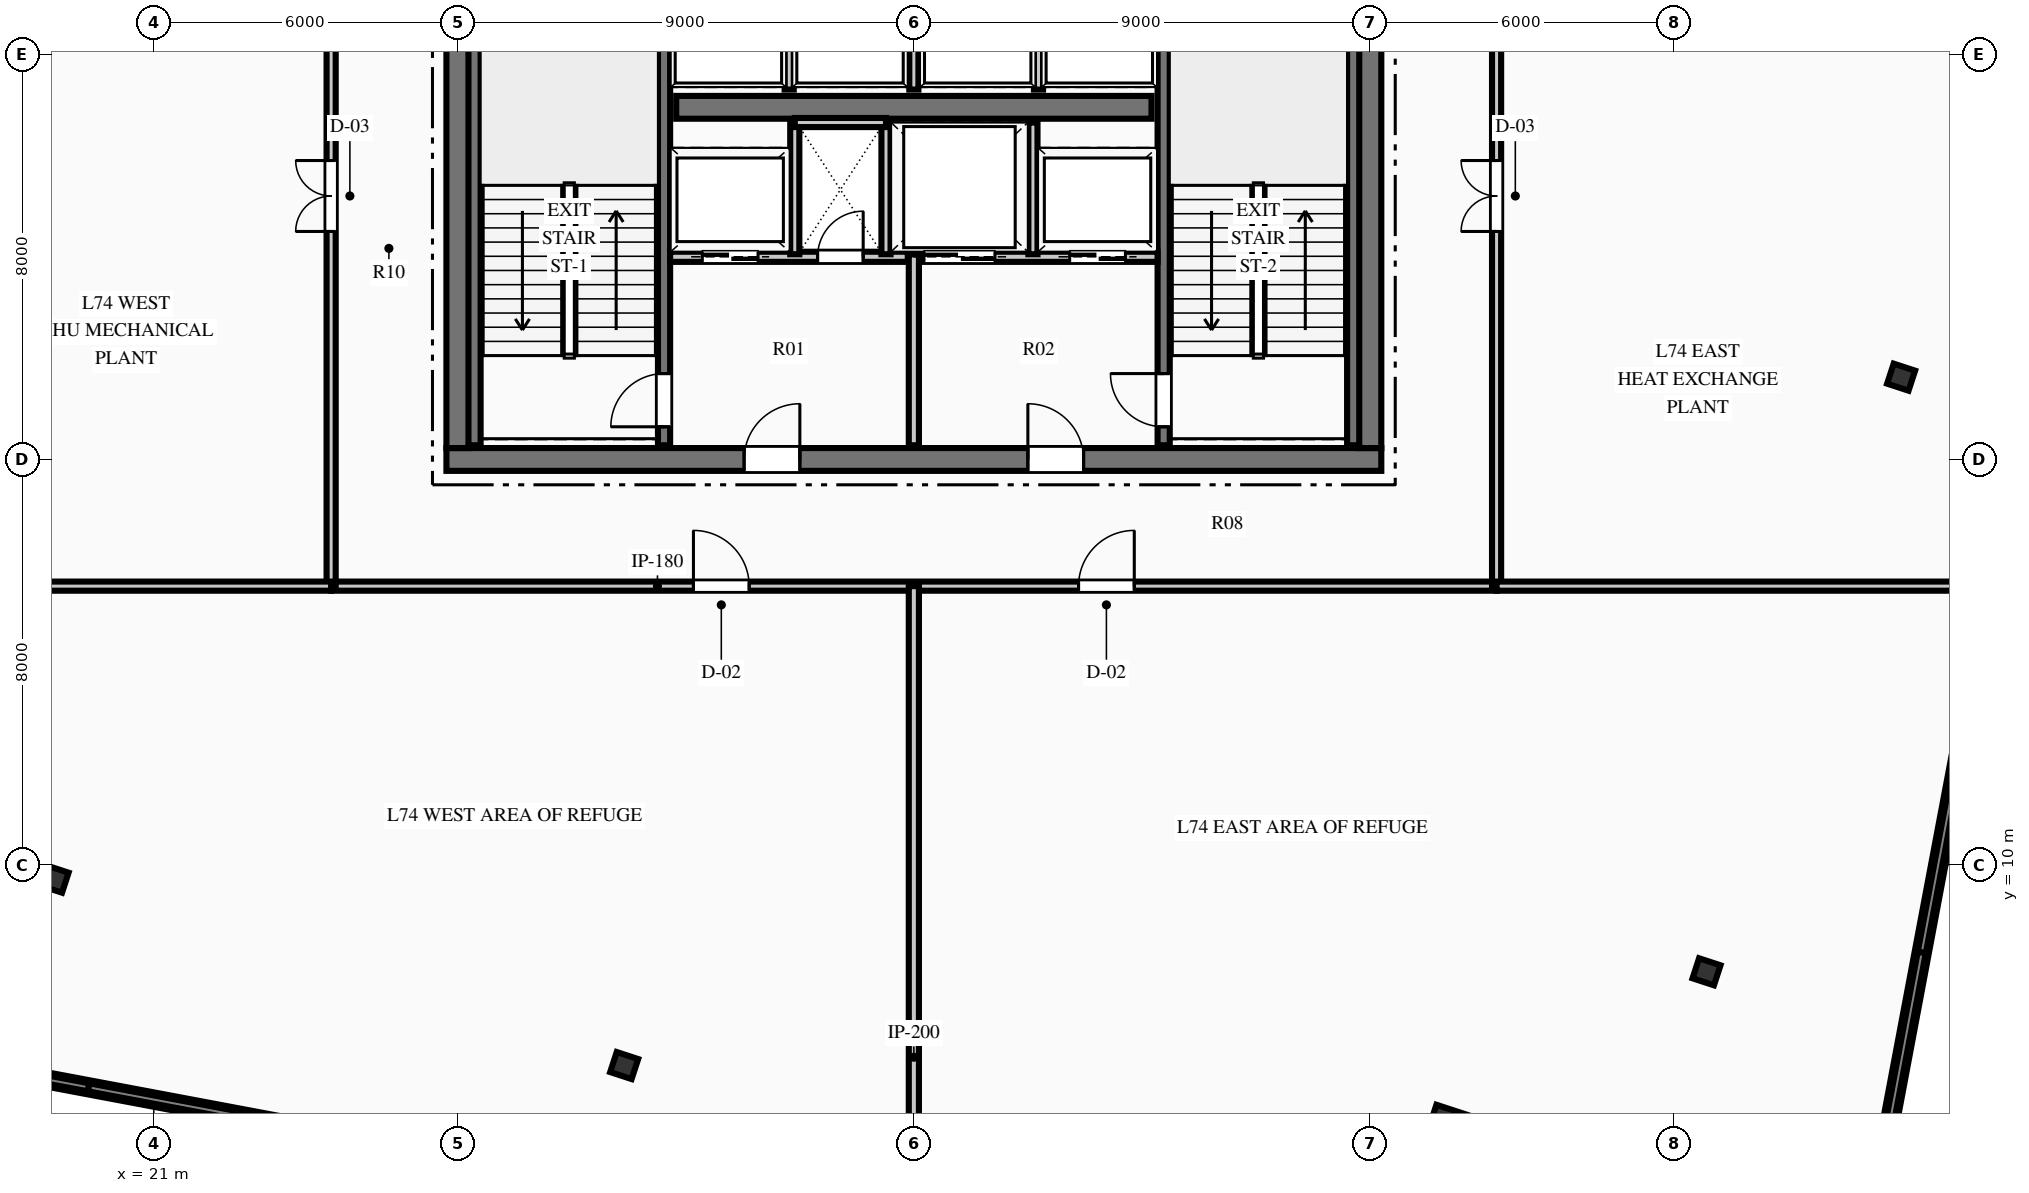
"""IFC4 building model, lengths in metres.
Left out: names, types, materials, properties, quantities, classifications, styles, units other than length and angle.
Written with IfcOpenShell. Run it as: python <this file> out.ifc"""

import sys

from ifc_helpers import new_model, si_unit, direction, frame, frame_2d, origin, origin_2d, place, context, subcontext, project, spatial, rectangle, hollow_rectangle, i_section, extrude, element, fill, save


model = new_model("IFC4")
c1 = context("Model", 3, precision=1e-05, world=origin(), true_north=direction((0.0, 1.0)))
c2 = subcontext(c1, "Body", "Model", "MODEL_VIEW")
j1 = project(units=[si_unit("LENGTHUNIT", "METRE"), si_unit("PLANEANGLEUNIT", "RADIAN")], contexts=[c1])
p1 = place(None, origin())
s1 = spatial("IfcSite", under=j1, at=p1, CompositionType="ELEMENT")
p2 = place(p1, origin())
s2 = spatial("IfcBuilding", under=s1, at=p2, CompositionType="ELEMENT")
p3 = place(p2, frame((0.0, 0.0, 293.7)))
s3 = spatial("IfcBuildingStorey", under=s2, at=p3, CompositionType="ELEMENT", Elevation=293.7)
p4 = place(p3, frame((26.775, 18.0, 0.0), z_axis=(0.0, 0.0, 1.0), x_axis=(1.0, 0.0, 0.0)))
e1 = element("IfcWall", 1, at=p4, inside=s3, PredefinedType="SHEAR", context=c2, shape_type="SweptSolid", body=[
    extrude(rectangle(XDim=18.45, YDim=0.45, at=frame_2d((9.225, 0.0))), origin(), (0.0, 0.0, 1.0), 4.5),
])
p5 = place(p4, frame((5.875, 0.0, 0.0)))
e2 = element("IfcOpeningElement", 2, at=p5, cuts=e1, PredefinedType="OPENING", context=c2, shape_type="SweptSolid", body=[
    extrude(rectangle(XDim=1.1, YDim=2.15, at=frame_2d((0.55, 1.075))), frame((0.0, 0.235, 0.0), z_axis=(0.0, -1.0, 0.0), x_axis=(1.0, 0.0, 0.0)), (0.0, 0.0, 1.0), 0.47),
])
p6 = place(p4, frame((11.475, 0.0, 0.0)))
e3 = element("IfcOpeningElement", 3, at=p6, cuts=e1, PredefinedType="OPENING", context=c2, shape_type="SweptSolid", body=[
    extrude(rectangle(XDim=1.1, YDim=2.15, at=frame_2d((0.55, 1.075))), frame((0.0, 0.235, 0.0), z_axis=(0.0, -1.0, 0.0), x_axis=(1.0, 0.0, 0.0)), (0.0, 0.0, 1.0), 0.47),
])
p7 = place(p3, frame((27.0, 18.225, 0.0), z_axis=(0.0, 0.0, 1.0), x_axis=(0.0, 1.0, 0.0)))
e4 = element("IfcWall", 4, at=p7, inside=s3, PredefinedType="SHEAR", context=c2, shape_type="SweptSolid", body=[
    extrude(rectangle(XDim=15.55, YDim=0.45, at=frame_2d((7.775, 0.0))), origin(), (0.0, 0.0, 1.0), 4.5),
])
p8 = place(p7, frame((10.015, 0.0, 0.0)))
e5 = element("IfcOpeningElement", 5, at=p8, cuts=e4, PredefinedType="OPENING", context=c2, shape_type="SweptSolid", body=[
    extrude(rectangle(XDim=1.4, YDim=2.2, at=frame_2d((0.7, 1.1))), frame((0.0, 0.235, 0.0), z_axis=(0.0, -1.0, 0.0), x_axis=(1.0, 0.0, 0.0)), (0.0, 0.0, 1.0), 0.47),
])
p9 = place(p3, frame((45.0, 18.225, 0.0), z_axis=(0.0, 0.0, 1.0), x_axis=(0.0, 1.0, 0.0)))
e6 = element("IfcWall", 6, at=p9, inside=s3, PredefinedType="SHEAR", context=c2, shape_type="SweptSolid", body=[
    extrude(rectangle(XDim=15.55, YDim=0.45, at=frame_2d((7.775, 0.0))), origin(), (0.0, 0.0, 1.0), 4.5),
])
p10 = place(p9, frame((10.015, 0.0, 0.0)))
e7 = element("IfcOpeningElement", 7, at=p10, cuts=e6, PredefinedType="OPENING", context=c2, shape_type="SweptSolid", body=[
    extrude(rectangle(XDim=1.4, YDim=2.2, at=frame_2d((0.7, 1.1))), frame((0.0, 0.235, 0.0), z_axis=(0.0, -1.0, 0.0), x_axis=(1.0, 0.0, 0.0)), (0.0, 0.0, 1.0), 0.47),
])
p11 = place(p3, frame((31.31, 24.95, 0.0), z_axis=(0.0, 0.0, 1.0), x_axis=(1.0, 0.0, 0.0)))
e8 = element("IfcWall", 8, at=p11, inside=s3, PredefinedType="SHEAR", context=c2, shape_type="SweptSolid", body=[
    extrude(rectangle(XDim=9.38, YDim=0.45, at=frame_2d((4.69, 0.0))), origin(), (0.0, 0.0, 1.0), 4.5),
])
p12 = place(p3, frame((31.07, 18.28, 0.0), z_axis=(0.0, 0.0, 1.0), x_axis=(0.0, 1.0, 0.0)))
e9 = element("IfcWall", 9, at=p12, inside=s3, PredefinedType="SHEAR", context=c2, shape_type="SweptSolid", body=[
    extrude(rectangle(XDim=8.26, YDim=0.24, at=frame_2d((4.13, 0.0))), origin(), (0.0, 0.0, 1.0), 4.5),
])
p13 = place(p12, frame((0.365, 0.0, 0.0)))
e10 = element("IfcOpeningElement", 10, at=p13, cuts=e9, PredefinedType="OPENING", context=c2, shape_type="SweptSolid", body=[
    extrude(rectangle(XDim=1.05, YDim=2.15, at=frame_2d((0.525, 1.075))), frame((0.0, 0.13, 0.0), z_axis=(0.0, -1.0, 0.0), x_axis=(1.0, 0.0, 0.0)), (0.0, 0.0, 1.0), 0.26),
])
p14 = place(p3, frame((27.33, 18.28, 0.0), z_axis=(0.0, 0.0, 1.0), x_axis=(0.0, 1.0, 0.0)))
e11 = element("IfcWall", 11, at=p14, inside=s3, PredefinedType="SHEAR", context=c2, shape_type="SweptSolid", body=[
    extrude(rectangle(XDim=8.26, YDim=0.24, at=frame_2d((4.13, 0.0))), origin(), (0.0, 0.0, 1.0), 4.5),
])
p15 = place(p3, frame((40.93, 18.28, 0.0), z_axis=(0.0, 0.0, 1.0), x_axis=(0.0, 1.0, 0.0)))
e12 = element("IfcWall", 12, at=p15, inside=s3, PredefinedType="SHEAR", context=c2, shape_type="SweptSolid", body=[
    extrude(rectangle(XDim=8.26, YDim=0.24, at=frame_2d((4.13, 0.0))), origin(), (0.0, 0.0, 1.0), 4.5),
])
p16 = place(p15, frame((0.365, 0.0, 0.0)))
e13 = element("IfcOpeningElement", 13, at=p16, cuts=e12, PredefinedType="OPENING", context=c2, shape_type="SweptSolid", body=[
    extrude(rectangle(XDim=1.05, YDim=2.15, at=frame_2d((0.525, 1.075))), frame((0.0, 0.13, 0.0), z_axis=(0.0, -1.0, 0.0), x_axis=(1.0, 0.0, 0.0)), (0.0, 0.0, 1.0), 0.26),
])
p17 = place(p3, frame((44.67, 18.28, 0.0), z_axis=(0.0, 0.0, 1.0), x_axis=(0.0, 1.0, 0.0)))
e14 = element("IfcWall", 14, at=p17, inside=s3, PredefinedType="SHEAR", context=c2, shape_type="SweptSolid", body=[
    extrude(rectangle(XDim=8.26, YDim=0.24, at=frame_2d((4.13, 0.0))), origin(), (0.0, 0.0, 1.0), 4.5),
])
p18 = place(p3, frame((46.728, 4.445, 0.0), z_axis=(0.0, 0.0, 1.0), x_axis=(0.311008203279, 0.950407227189, 0.0)))
e15 = element("IfcColumn", 15, at=p18, inside=s3, PredefinedType="COLUMN", context=c2, shape_type="SweptSolid", body=[
    extrude(hollow_rectangle(XDim=1.3, YDim=1.3, WallThickness=0.06, at=origin_2d()), origin(), (0.0, 0.0, 1.0), 4.5),
])
for number, where, z_axis, x_axis in (
    (16, (51.643, 7.889, 0.0), (0.0, 0.0, 1.0), (0.311, 0.95, 0.0)),
    (17, (55.483, 19.624, 0.0), (0.0, 0.0, 1.0), (0.311, 0.95, 0.0)),
    (18, (19.043, 9.716, 0.0), (0.0, 0.0, 1.0), (0.311, 0.95, 0.0)),
    (19, (30.283, 6.038, 0.0), (0.0, 0.0, 1.0), (0.311, 0.95, 0.0)),
):
    element("IfcColumn", number, at=place(p3, frame(where, z_axis=z_axis, x_axis=x_axis)), inside=s3, PredefinedType="COLUMN", context=c2, shape_type="SweptSolid", body=[
        extrude(i_section(OverallWidth=0.416, OverallDepth=0.445, WebThickness=0.039, FlangeThickness=0.063, at=origin_2d()), origin(), (0.0, 0.0, 1.0), 4.5),
    ])
p19 = place(p3, frame((58.432, 21.782, 0.0), z_axis=(0.0, 0.0, 1.0), x_axis=(-0.184810744713, -0.982774129003, 0.0)))
e20 = element("IfcWall", 20, at=p19, inside=s3, PredefinedType="STANDARD", context=c2, shape_type="SweptSolid", body=[
    extrude(rectangle(XDim=19.25, YDim=0.28, at=frame_2d((9.625, 0.0))), origin(), (0.0, 0.0, 1.0), 1.15),
])
p20 = place(p3, frame((32.514, 3.202, 0.0), z_axis=(0.0, 0.0, 1.0), x_axis=(-0.982774906714, 0.184806609009, 0.0)))
e21 = element("IfcWall", 21, at=p20, inside=s3, PredefinedType="STANDARD", context=c2, shape_type="SweptSolid", body=[
    extrude(rectangle(XDim=18.237, YDim=0.28, at=frame_2d((9.119, 0.0))), origin(), (0.0, 0.0, 1.0), 1.15),
])
p21 = place(p3, frame((36.0, 18.28, 0.0), z_axis=(0.0, 0.0, 1.0), x_axis=(0.0, 1.0, 0.0)))
e22 = element("IfcWall", 22, at=p21, inside=s3, PredefinedType="PARTITIONING", context=c2, shape_type="SweptSolid", body=[
    extrude(rectangle(XDim=3.77, YDim=0.2, at=frame_2d((1.885, 0.0))), origin(), (0.0, 0.0, 1.0), 4.1),
])
p22 = place(p3, frame((31.19, 22.0, 0.0), z_axis=(0.0, 0.0, 1.0), x_axis=(1.0, 0.0, 0.0)))
e23 = element("IfcWall", 23, at=p22, inside=s3, PredefinedType="PARTITIONING", context=c2, shape_type="SweptSolid", body=[
    extrude(rectangle(XDim=4.69, YDim=0.2, at=frame_2d((2.345, 0.0))), origin(), (0.0, 0.0, 1.0), 4.1),
])
p23 = place(p22, frame((2.91, 0.0, 0.0)))
e24 = element("IfcOpeningElement", 24, at=p23, cuts=e23, PredefinedType="OPENING", context=c2, shape_type="SweptSolid", body=[
    extrude(rectangle(XDim=0.9, YDim=2.15, at=frame_2d((0.45, 1.075))), frame((0.0, 0.11, 0.0), z_axis=(0.0, -1.0, 0.0), x_axis=(1.0, 0.0, 0.0)), (0.0, 0.0, 1.0), 0.22),
])
p24 = place(p22, frame((0.635, 0.0, 0.0)))
e25 = element("IfcOpeningElement", 25, at=p24, cuts=e23, PredefinedType="OPENING", context=c2, shape_type="SweptSolid", body=[
    extrude(rectangle(XDim=1.1, YDim=2.15, at=frame_2d((0.55, 1.075))), frame((0.0, 0.11, 0.0), z_axis=(0.0, -1.0, 0.0), x_axis=(1.0, 0.0, 0.0)), (0.0, 0.0, 1.0), 0.22),
])
p25 = place(p3, frame((36.12, 22.0, 0.0), z_axis=(0.0, 0.0, 1.0), x_axis=(1.0, 0.0, 0.0)))
e26 = element("IfcWall", 26, at=p25, inside=s3, PredefinedType="PARTITIONING", context=c2, shape_type="SweptSolid", body=[
    extrude(rectangle(XDim=4.69, YDim=0.2, at=frame_2d((2.345, 0.0))), origin(), (0.0, 0.0, 1.0), 4.1),
])
p26 = place(p25, frame((2.955, 0.0, 0.0)))
e27 = element("IfcOpeningElement", 27, at=p26, cuts=e26, PredefinedType="OPENING", context=c2, shape_type="SweptSolid", body=[
    extrude(rectangle(XDim=1.1, YDim=2.15, at=frame_2d((0.55, 1.075))), frame((0.0, 0.11, 0.0), z_axis=(0.0, -1.0, 0.0), x_axis=(1.0, 0.0, 0.0)), (0.0, 0.0, 1.0), 0.22),
])
p27 = place(p25, frame((0.08, 0.0, 0.0)))
e28 = element("IfcOpeningElement", 28, at=p27, cuts=e26, PredefinedType="OPENING", context=c2, shape_type="SweptSolid", body=[
    extrude(rectangle(XDim=1.4, YDim=2.2, at=frame_2d((0.7, 1.1))), frame((0.0, 0.11, 0.0), z_axis=(0.0, -1.0, 0.0), x_axis=(1.0, 0.0, 0.0)), (0.0, 0.0, 1.0), 0.22),
])
for number, where, z_axis, x_axis in (
    (29, (33.65, 22.05, 0.0), (0.0, 0.0, 1.0), (0.0, 1.0, 0.0)),
    (30, (35.45, 22.05, 0.0), (0.0, 0.0, 1.0), (0.0, 1.0, 0.0)),
):
    element("IfcWall", number, at=place(p3, frame(where, z_axis=z_axis, x_axis=x_axis)), inside=s3, PredefinedType="PARTITIONING", context=c2, shape_type="SweptSolid", body=[
        extrude(rectangle(XDim=2.6, YDim=0.18, at=frame_2d((1.3, 0.0))), origin(), (0.0, 0.0, 1.0), 4.1),
    ])
p28 = place(p3, frame((33.65, 24.65, 0.0), z_axis=(0.0, 0.0, 1.0), x_axis=(1.0, 0.0, 0.0)))
e31 = element("IfcWall", 31, at=p28, inside=s3, PredefinedType="PARTITIONING", context=c2, shape_type="SweptSolid", body=[
    extrude(rectangle(XDim=1.8, YDim=0.18, at=frame_2d((0.9, 0.0))), origin(), (0.0, 0.0, 1.0), 4.1),
])
p29 = place(p3, frame((38.35, 22.05, 0.0), z_axis=(0.0, 0.0, 1.0), x_axis=(0.0, 1.0, 0.0)))
e32 = element("IfcWall", 32, at=p29, inside=s3, PredefinedType="PARTITIONING", context=c2, shape_type="SweptSolid", body=[
    extrude(rectangle(XDim=2.6, YDim=0.18, at=frame_2d((1.3, 0.0))), origin(), (0.0, 0.0, 1.0), 4.1),
])
for number, where, z_axis, x_axis in (
    (33, (33.54, 25.3, 0.0), (0.0, 0.0, 1.0), (0.0, 1.0, 0.0)),
    (34, (36.0, 25.3, 0.0), (0.0, 0.0, 1.0), (0.0, 1.0, 0.0)),
    (35, (38.46, 25.3, 0.0), (0.0, 0.0, 1.0), (0.0, 1.0, 0.0)),
):
    element("IfcWall", number, at=place(p3, frame(where, z_axis=z_axis, x_axis=x_axis)), inside=s3, PredefinedType="PARTITIONING", context=c2, shape_type="SweptSolid", body=[
        extrude(rectangle(XDim=1.9, YDim=0.18, at=frame_2d((0.95, 0.0))), origin(), (0.0, 0.0, 1.0), 4.1),
    ])
p30 = place(p3, frame((24.5, 15.5, 0.0), z_axis=(0.0, 0.0, 1.0), x_axis=(1.0, 0.0, 0.0)))
e36 = element("IfcWall", 36, at=p30, inside=s3, PredefinedType="PARTITIONING", context=c2, shape_type="SweptSolid", body=[
    extrude(rectangle(XDim=23.0, YDim=0.18, at=frame_2d((11.5, 0.0))), origin(), (0.0, 0.0, 1.0), 4.1),
])
p31 = place(p30, frame((7.15, 0.0, 0.0)))
e37 = element("IfcOpeningElement", 37, at=p31, cuts=e36, PredefinedType="OPENING", context=c2, shape_type="SweptSolid", body=[
    extrude(rectangle(XDim=1.1, YDim=2.15, at=frame_2d((0.55, 1.075))), frame((0.0, 0.1, 0.0), z_axis=(0.0, -1.0, 0.0), x_axis=(1.0, 0.0, 0.0)), (0.0, 0.0, 1.0), 0.2),
])
p32 = place(p30, frame((14.75, 0.0, 0.0)))
e38 = element("IfcOpeningElement", 38, at=p32, cuts=e36, PredefinedType="OPENING", context=c2, shape_type="SweptSolid", body=[
    extrude(rectangle(XDim=1.1, YDim=2.15, at=frame_2d((0.55, 1.075))), frame((0.0, 0.1, 0.0), z_axis=(0.0, -1.0, 0.0), x_axis=(1.0, 0.0, 0.0)), (0.0, 0.0, 1.0), 0.2),
])
p33 = place(p3, frame((24.5, 15.5, 0.0), z_axis=(0.0, 0.0, 1.0), x_axis=(0.0, 1.0, 0.0)))
e39 = element("IfcWall", 39, at=p33, inside=s3, PredefinedType="PARTITIONING", context=c2, shape_type="SweptSolid", body=[
    extrude(rectangle(XDim=21.0, YDim=0.18, at=frame_2d((10.5, 0.0))), origin(), (0.0, 0.0, 1.0), 4.1),
])
p34 = place(p33, frame((7.0, 0.0, 0.0)))
e40 = element("IfcOpeningElement", 40, at=p34, cuts=e39, PredefinedType="OPENING", context=c2, shape_type="SweptSolid", body=[
    extrude(rectangle(XDim=1.4, YDim=2.2, at=frame_2d((0.7, 1.1))), frame((0.0, 0.1, 0.0), z_axis=(0.0, -1.0, 0.0), x_axis=(1.0, 0.0, 0.0)), (0.0, 0.0, 1.0), 0.2),
])
p35 = place(p3, frame((47.5, 15.5, 0.0), z_axis=(0.0, 0.0, 1.0), x_axis=(0.0, 1.0, 0.0)))
e41 = element("IfcWall", 41, at=p35, inside=s3, PredefinedType="PARTITIONING", context=c2, shape_type="SweptSolid", body=[
    extrude(rectangle(XDim=21.0, YDim=0.18, at=frame_2d((10.5, 0.0))), origin(), (0.0, 0.0, 1.0), 4.1),
])
p36 = place(p35, frame((7.0, 0.0, 0.0)))
e42 = element("IfcOpeningElement", 42, at=p36, cuts=e41, PredefinedType="OPENING", context=c2, shape_type="SweptSolid", body=[
    extrude(rectangle(XDim=1.4, YDim=2.2, at=frame_2d((0.7, 1.1))), frame((0.0, 0.1, 0.0), z_axis=(0.0, -1.0, 0.0), x_axis=(1.0, 0.0, 0.0)), (0.0, 0.0, 1.0), 0.2),
])
p37 = place(p3, frame((36.0, 2.587, 0.0), z_axis=(0.0, 0.0, 1.0), x_axis=(0.0, 1.0, 0.0)))
e43 = element("IfcWall", 43, at=p37, inside=s3, PredefinedType="PARTITIONING", context=c2, shape_type="SweptSolid", body=[
    extrude(rectangle(XDim=12.913, YDim=0.2, at=frame_2d((6.457, 0.0))), origin(), (0.0, 0.0, 1.0), 2.895),
])
p38 = place(p3, frame((12.444, 15.5, 0.0), z_axis=(0.0, 0.0, 1.0), x_axis=(1.0, 0.0, 0.0)))
e44 = element("IfcWall", 44, at=p38, inside=s3, PredefinedType="PARTITIONING", context=c2, shape_type="SweptSolid", body=[
    extrude(rectangle(XDim=12.056, YDim=0.18, at=frame_2d((6.028, 0.0))), origin(), (0.0, 0.0, 1.0), 3.689),
])
p39 = place(p3, frame((47.5, 15.5, 0.0), z_axis=(0.0, 0.0, 1.0), x_axis=(1.0, 0.0, 0.0)))
e45 = element("IfcWall", 45, at=p39, inside=s3, PredefinedType="PARTITIONING", context=c2, shape_type="SweptSolid", body=[
    extrude(rectangle(XDim=9.71, YDim=0.18, at=frame_2d((4.855, 0.0))), origin(), (0.0, 0.0, 1.0), 3.478),
])
p40 = place(p13, origin())
e46 = element("IfcDoor", 46, at=p40, inside=s3, OperationType="SINGLE_SWING_LEFT", PredefinedType="DOOR", context=c2, shape_type="SweptSolid", body=[
    extrude(rectangle(XDim=1.05, YDim=2.15, at=frame_2d((0.525, 1.075))), frame((0.0, 0.025, 0.0), z_axis=(0.0, -1.0, 0.0), x_axis=(1.0, 0.0, 0.0)), (0.0, 0.0, 1.0), 0.05),
])
fill(e10, e46)
p41 = place(p16, origin())
e47 = element("IfcDoor", 47, at=p41, inside=s3, OperationType="SINGLE_SWING_RIGHT", PredefinedType="DOOR", context=c2, shape_type="SweptSolid", body=[
    extrude(rectangle(XDim=1.05, YDim=2.15, at=frame_2d((0.525, 1.075))), frame((0.0, 0.025, 0.0), z_axis=(0.0, -1.0, 0.0), x_axis=(1.0, 0.0, 0.0)), (0.0, 0.0, 1.0), 0.05),
])
fill(e13, e47)
p42 = place(p5, origin())
e48 = element("IfcDoor", 48, at=p42, inside=s3, OperationType="SINGLE_SWING_RIGHT", PredefinedType="DOOR", context=c2, shape_type="SweptSolid", body=[
    extrude(rectangle(XDim=1.1, YDim=2.15, at=frame_2d((0.55, 1.075))), frame((0.0, 0.025, 0.0), z_axis=(0.0, -1.0, 0.0), x_axis=(1.0, 0.0, 0.0)), (0.0, 0.0, 1.0), 0.05),
])
fill(e2, e48)
p43 = place(p6, origin())
e49 = element("IfcDoor", 49, at=p43, inside=s3, OperationType="SINGLE_SWING_LEFT", PredefinedType="DOOR", context=c2, shape_type="SweptSolid", body=[
    extrude(rectangle(XDim=1.1, YDim=2.15, at=frame_2d((0.55, 1.075))), frame((0.0, 0.025, 0.0), z_axis=(0.0, -1.0, 0.0), x_axis=(1.0, 0.0, 0.0)), (0.0, 0.0, 1.0), 0.05),
])
fill(e3, e49)
p44 = place(p23, origin())
e50 = element("IfcDoor", 50, at=p44, inside=s3, OperationType="SINGLE_SWING_RIGHT", PredefinedType="DOOR", context=c2, shape_type="SweptSolid", body=[
    extrude(rectangle(XDim=0.9, YDim=2.15, at=frame_2d((0.45, 1.075))), frame((0.0, 0.025, 0.0), z_axis=(0.0, -1.0, 0.0), x_axis=(1.0, 0.0, 0.0)), (0.0, 0.0, 1.0), 0.05),
])
fill(e24, e50)
p45 = place(p31, origin())
e51 = element("IfcDoor", 51, at=p45, inside=s3, OperationType="SINGLE_SWING_LEFT", PredefinedType="DOOR", context=c2, shape_type="SweptSolid", body=[
    extrude(rectangle(XDim=1.1, YDim=2.15, at=frame_2d((0.55, 1.075))), frame((0.0, 0.025, 0.0), z_axis=(0.0, -1.0, 0.0), x_axis=(1.0, 0.0, 0.0)), (0.0, 0.0, 1.0), 0.05),
])
fill(e37, e51)
p46 = place(p32, origin())
e52 = element("IfcDoor", 52, at=p46, inside=s3, OperationType="SINGLE_SWING_RIGHT", PredefinedType="DOOR", context=c2, shape_type="SweptSolid", body=[
    extrude(rectangle(XDim=1.1, YDim=2.15, at=frame_2d((0.55, 1.075))), frame((0.0, 0.025, 0.0), z_axis=(0.0, -1.0, 0.0), x_axis=(1.0, 0.0, 0.0)), (0.0, 0.0, 1.0), 0.05),
])
fill(e38, e52)
p47 = place(p34, origin())
e53 = element("IfcDoor", 53, at=p47, inside=s3, OperationType="DOUBLE_DOOR_SINGLE_SWING", PredefinedType="DOOR", context=c2, shape_type="SweptSolid", body=[
    extrude(rectangle(XDim=1.4, YDim=2.2, at=frame_2d((0.7, 1.1))), frame((0.0, 0.025, 0.0), z_axis=(0.0, -1.0, 0.0), x_axis=(1.0, 0.0, 0.0)), (0.0, 0.0, 1.0), 0.05),
])
fill(e40, e53)
p48 = place(p36, origin())
e54 = element("IfcDoor", 54, at=p48, inside=s3, OperationType="DOUBLE_DOOR_SINGLE_SWING", PredefinedType="DOOR", context=c2, shape_type="SweptSolid", body=[
    extrude(rectangle(XDim=1.4, YDim=2.2, at=frame_2d((0.7, 1.1))), frame((0.0, 0.025, 0.0), z_axis=(0.0, -1.0, 0.0), x_axis=(1.0, 0.0, 0.0)), (0.0, 0.0, 1.0), 0.05),
])
fill(e42, e54)
p49 = place(p24, origin())
e55 = element("IfcDoor", 55, at=p49, inside=s3, OperationType="SLIDING_TO_LEFT", PredefinedType="DOOR", context=c2, shape_type="SweptSolid", body=[
    extrude(rectangle(XDim=1.1, YDim=2.15, at=frame_2d((0.55, 1.075))), frame((0.0, 0.025, 0.0), z_axis=(0.0, -1.0, 0.0), x_axis=(1.0, 0.0, 0.0)), (0.0, 0.0, 1.0), 0.05),
])
fill(e25, e55)
p50 = place(p26, origin())
e56 = element("IfcDoor", 56, at=p50, inside=s3, OperationType="SLIDING_TO_LEFT", PredefinedType="DOOR", context=c2, shape_type="SweptSolid", body=[
    extrude(rectangle(XDim=1.1, YDim=2.15, at=frame_2d((0.55, 1.075))), frame((0.0, 0.025, 0.0), z_axis=(0.0, -1.0, 0.0), x_axis=(1.0, 0.0, 0.0)), (0.0, 0.0, 1.0), 0.05),
])
fill(e27, e56)
p51 = place(p27, origin())
e57 = element("IfcDoor", 57, at=p51, inside=s3, OperationType="SLIDING_TO_LEFT", PredefinedType="DOOR", context=c2, shape_type="SweptSolid", body=[
    extrude(rectangle(XDim=1.4, YDim=2.2, at=frame_2d((0.7, 1.1))), frame((0.0, 0.025, 0.0), z_axis=(0.0, -1.0, 0.0), x_axis=(1.0, 0.0, 0.0)), (0.0, 0.0, 1.0), 0.05),
])
fill(e28, e57)
save(model, sys.argv[1])
